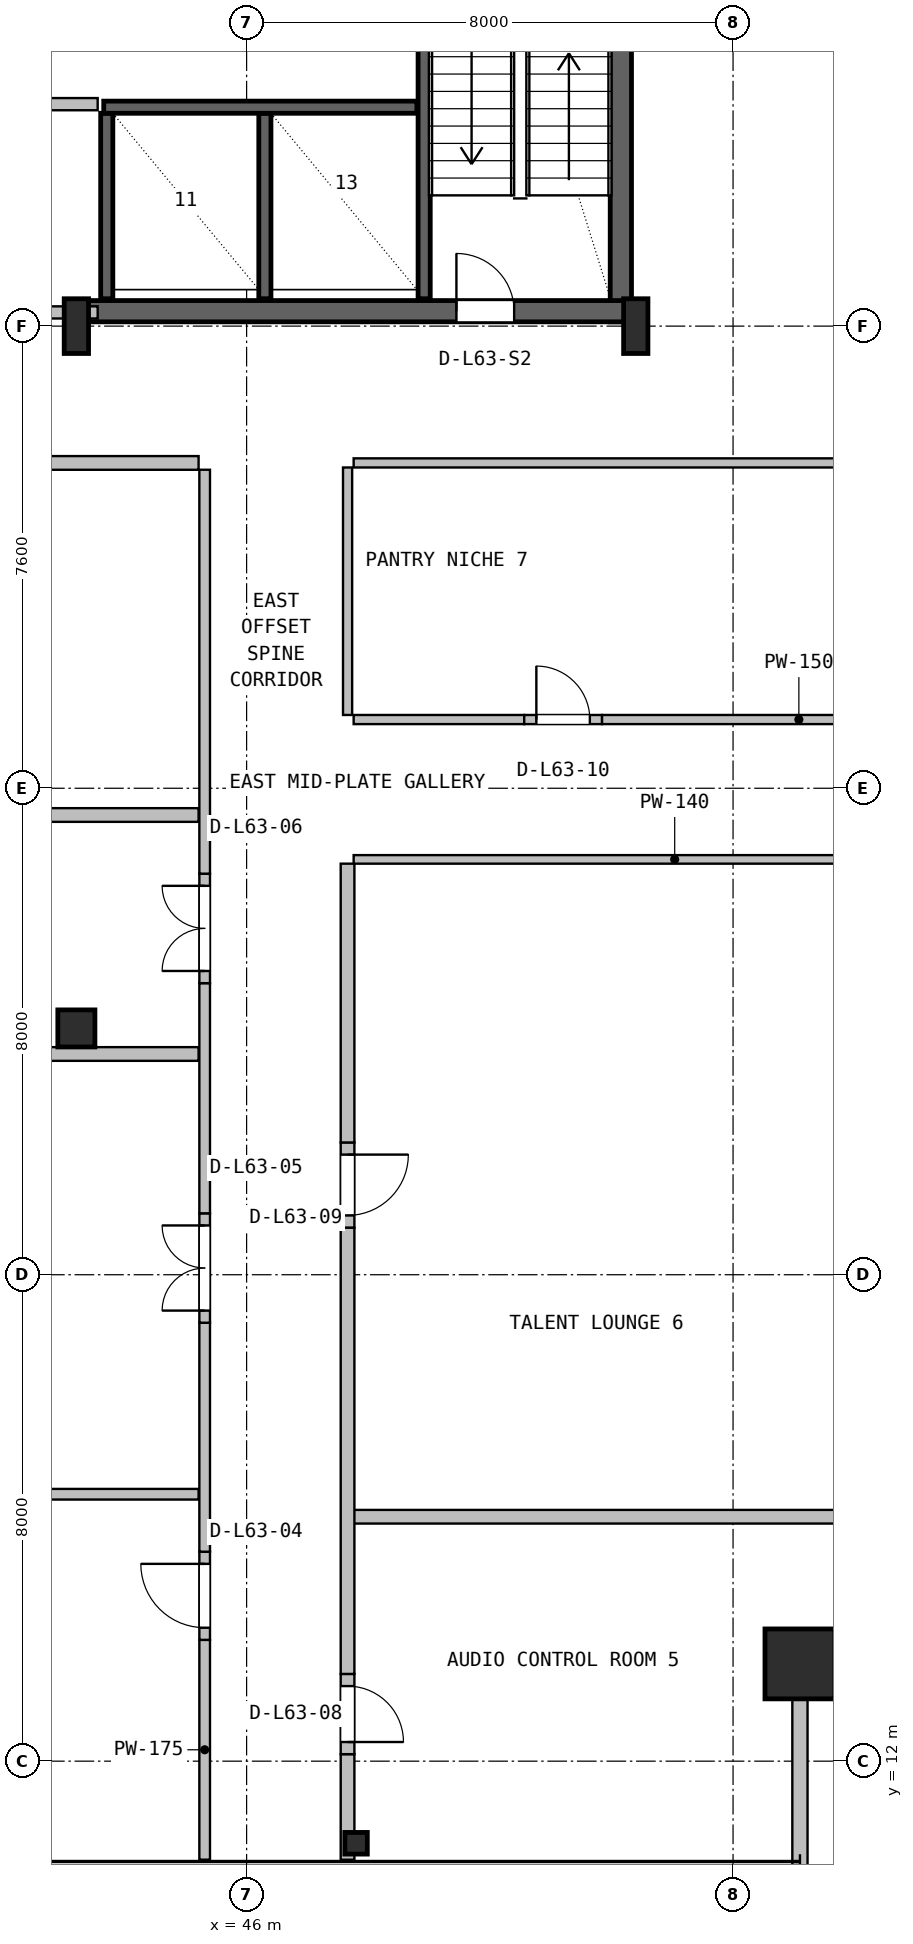
"""IFC4 building model, lengths in metres.
Left out: names, types, materials, properties, quantities, classifications, styles, units other than length and angle.
Written with IfcOpenShell. Run it as: python <this file> out.ifc"""

import sys

from ifc_helpers import new_model, si_unit, direction, frame, frame_2d, origin, origin_2d, place, context, subcontext, project, spatial, rectangle, hollow_rectangle, hollow_circle, i_section, extrude, source, transform, mapped, element, fill, save


model = new_model("IFC4")
c1 = context("Model", 3, precision=1e-05, world=origin(), true_north=direction((0.0, 1.0)))
c2 = subcontext(c1, "Body", "Model", "MODEL_VIEW")
j1 = project(units=[si_unit("LENGTHUNIT", "METRE"), si_unit("PLANEANGLEUNIT", "RADIAN")], contexts=[c1])
p1 = place(None, origin())
s1 = spatial("IfcSite", under=j1, at=p1, CompositionType="ELEMENT")
p2 = place(p1, origin())
s2 = spatial("IfcBuilding", under=s1, at=p2, CompositionType="ELEMENT")
p3 = place(p2, frame((0.0, 0.0, 254.6)))
s3 = spatial("IfcBuildingStorey", under=s2, at=p3, CompositionType="ELEMENT", Elevation=254.6)
p4 = place(p3, frame((52.155, 35.67, 0.0), z_axis=(0.0, 0.0, 1.0), x_axis=(0.0, 1.0, 0.0)))
e1 = element("IfcWall", 1, at=p4, inside=s3, PredefinedType="SHEAR", context=c2, shape_type="SweptSolid", body=[
    extrude(rectangle(XDim=11.13, YDim=0.35, at=frame_2d((5.565, 0.0))), origin(), (0.0, 0.0, 1.0), 3.55),
])
p5 = place(p3, frame((43.2, 35.845, 0.0), z_axis=(0.0, 0.0, 1.0), x_axis=(1.0, 0.0, 0.0)))
e2 = element("IfcWall", 2, at=p5, inside=s3, PredefinedType="SHEAR", context=c2, shape_type="SweptSolid", body=[
    extrude(rectangle(XDim=9.13, YDim=0.35, at=frame_2d((4.565, 0.0))), origin(), (0.0, 0.0, 1.0), 3.55),
])
p6 = place(p5, frame((6.25, 0.0, 0.0)))
e3 = element("IfcOpeningElement", 3, at=p6, cuts=e2, PredefinedType="OPENING", context=c2, shape_type="SweptSolid", body=[
    extrude(rectangle(XDim=0.95, YDim=2.1, at=frame_2d((0.475, 1.05))), frame((0.0, 0.185, 0.0), z_axis=(0.0, -1.0, 0.0), x_axis=(1.0, 0.0, 0.0)), (0.0, 0.0, 1.0), 0.37),
])
m1 = source(origin(), c2, "Body", "SweptSolid", [
    extrude(i_section(OverallWidth=0.4, OverallDepth=0.9, WebThickness=0.016, FlangeThickness=0.028, FilletRadius=0.016, at=origin_2d()), origin(), (0.0, 0.0, 1.0), 3.8),
])
for number, where, z_axis, x_axis in (
    (4, (43.2, 35.6, 0.0), (0.0, 0.0, 1.0), (1.0, 0.0, 0.0)),
    (5, (52.4, 35.6, 0.0), (0.0, 0.0, 1.0), (1.0, 0.0, 0.0)),
):
    element("IfcColumn", number, at=place(p3, frame(where, z_axis=z_axis, x_axis=x_axis)), inside=s3, PredefinedType="COLUMN", context=c2, shape_type="MappedRepresentation", body=[
        mapped(m1, transform((0.0, 0.0, 0.0), x_axis=(1.0, 0.0, 0.0), y_axis=(0.0, 1.0, 0.0), z_axis=(0.0, 0.0, 1.0), scale=1.0)),
    ])
m2 = source(origin(), c2, "Body", "SweptSolid", [
    extrude(hollow_rectangle(XDim=1.15, YDim=1.15, WallThickness=0.045, at=origin_2d()), origin(), (0.0, 0.0, 1.0), 3.8),
])
p7 = place(p3, frame((55.1, 13.6, 0.0), z_axis=(0.0, 0.0, 1.0), x_axis=(1.0, 0.0, 0.0)))
e6 = element("IfcColumn", 6, at=p7, inside=s3, PredefinedType="COLUMN", context=c2, shape_type="MappedRepresentation", body=[
    mapped(m2, transform((0.0, 0.0, 0.0), x_axis=(1.0, 0.0, 0.0), y_axis=(0.0, 1.0, 0.0), z_axis=(0.0, 0.0, 1.0), scale=1.0)),
])
m3 = source(origin(), c2, "Body", "SweptSolid", [
    extrude(i_section(OverallWidth=0.369, OverallDepth=0.356, WebThickness=0.011, FlangeThickness=0.018, FilletRadius=0.016, at=origin_2d()), origin(), (0.0, 0.0, 1.0), 3.8),
])
p8 = place(p3, frame((47.8, 10.65, 0.0), z_axis=(0.0, 0.0, 1.0), x_axis=(1.0, 0.0, 0.0)))
e7 = element("IfcColumn", 7, at=p8, inside=s3, PredefinedType="COLUMN", context=c2, shape_type="MappedRepresentation", body=[
    mapped(m3, transform((0.0, 0.0, 0.0), x_axis=(1.0, 0.0, 0.0), y_axis=(0.0, 1.0, 0.0), z_axis=(0.0, 0.0, 1.0), scale=1.0)),
])
m4 = source(origin(), c2, "Body", "SweptSolid", [
    extrude(hollow_circle(Radius=0.305, WallThickness=0.025, at=origin_2d()), origin(), (0.0, 0.0, 1.0), 3.8),
])
p9 = place(p3, frame((43.2, 24.05, 0.0), z_axis=(0.0, 0.0, 1.0), x_axis=(1.0, 0.0, 0.0)))
e8 = element("IfcColumn", 8, at=p9, inside=s3, PredefinedType="COLUMN", context=c2, shape_type="MappedRepresentation", body=[
    mapped(m4, transform((0.0, 0.0, 0.0), x_axis=(1.0, 0.0, 0.0), y_axis=(0.0, 1.0, 0.0), z_axis=(0.0, 0.0, 1.0), scale=1.0)),
])
p10 = place(p3, frame((55.1, 10.28, 0.0), z_axis=(0.0, 0.0, 1.0), x_axis=(0.0, 1.0, 0.0)))
e9 = element("IfcWall", 9, at=p10, inside=s3, PredefinedType="SOLIDWALL", context=c2, shape_type="SweptSolid", body=[
    extrude(rectangle(XDim=3.4, YDim=0.25, at=frame_2d((1.7, 0.0))), origin(), (0.0, 0.0, 1.0), 1.925),
])
p11 = place(p3, frame((48.92, 36.05, 0.0), z_axis=(0.0, 0.0, 1.0), x_axis=(0.0, 1.0, 0.0)))
e10 = element("IfcWall", 10, at=p11, inside=s3, PredefinedType="SHEAR", context=c2, shape_type="SweptSolid", body=[
    extrude(rectangle(XDim=10.5, YDim=0.2, at=frame_2d((5.25, 0.0))), origin(), (0.0, 0.0, 1.0), 3.55),
])
for number, where, z_axis, x_axis in (
    (11, (43.7, 36.05, 0.0), (0.0, 0.0, 1.0), (0.0, 1.0, 0.0)),
    (12, (46.3, 36.05, 0.0), (0.0, 0.0, 1.0), (0.0, 1.0, 0.0)),
):
    element("IfcWall", number, at=place(p3, frame(where, z_axis=z_axis, x_axis=x_axis)), inside=s3, PredefinedType="SHEAR", context=c2, shape_type="SweptSolid", body=[
        extrude(rectangle(XDim=3.05, YDim=0.2, at=frame_2d((1.525, 0.0))), origin(), (0.0, 0.0, 1.0), 3.55),
    ])
p12 = place(p3, frame((43.65, 39.2, 0.0), z_axis=(0.0, 0.0, 1.0), x_axis=(1.0, 0.0, 0.0)))
e13 = element("IfcWall", 13, at=p12, inside=s3, PredefinedType="SHEAR", context=c2, shape_type="SweptSolid", body=[
    extrude(rectangle(XDim=5.15, YDim=0.2, at=frame_2d((2.575, 0.0))), origin(), (0.0, 0.0, 1.0), 3.55),
])
p13 = place(p3, frame((39.85, 35.825, 0.0), z_axis=(0.0, 0.0, 1.0), x_axis=(1.0, 0.0, 0.0)))
e14 = element("IfcWall", 14, at=p13, inside=s3, PredefinedType="SOLIDWALL", context=c2, shape_type="SweptSolid", body=[
    extrude(rectangle(XDim=3.7, YDim=0.2, at=frame_2d((1.85, 0.0))), origin(), (0.0, 0.0, 1.0), 2.575),
])
p14 = place(p3, frame((39.85, 39.25, 0.0), z_axis=(0.0, 0.0, 1.0), x_axis=(1.0, 0.0, 0.0)))
e15 = element("IfcWall", 15, at=p14, inside=s3, PredefinedType="SOLIDWALL", context=c2, shape_type="SweptSolid", body=[
    extrude(rectangle(XDim=3.7, YDim=0.2, at=frame_2d((1.85, 0.0))), origin(), (0.0, 0.0, 1.0), 3.53),
])
p15 = place(p14, frame((1.25, 0.0, 0.0)))
e16 = element("IfcOpeningElement", 16, at=p15, cuts=e15, PredefinedType="OPENING", context=c2, shape_type="SweptSolid", body=[
    extrude(rectangle(XDim=1.2, YDim=2.1, at=frame_2d((0.6, 1.05))), frame((0.0, 0.11, 0.0), z_axis=(0.0, -1.0, 0.0), x_axis=(1.0, 0.0, 0.0)), (0.0, 0.0, 1.0), 0.22),
])
p16 = place(p3, frame((45.31, 10.38, 0.0), z_axis=(0.0, 0.0, 1.0), x_axis=(0.0, 1.0, 0.0)))
e17 = element("IfcWall", 17, at=p16, inside=s3, PredefinedType="PARTITIONING", context=c2, shape_type="SweptSolid", body=[
    extrude(rectangle(XDim=3.615, YDim=0.175, at=frame_2d((1.808, 0.0))), origin(), (0.0, 0.0, 1.0), 1.925),
])
p17 = place(p3, frame((45.31, 13.995, 0.0), z_axis=(0.0, 0.0, 1.0), x_axis=(0.0, 1.0, 0.0)))
e18 = element("IfcWall", 18, at=p17, inside=s3, PredefinedType="PARTITIONING", context=c2, shape_type="SweptSolid", body=[
    extrude(rectangle(XDim=1.45, YDim=0.175, at=frame_2d((0.725, 0.0))), origin(), (0.0, 0.0, 1.0), 3.278),
])
p18 = place(p17, frame((0.2, 0.0, 0.0)))
e19 = element("IfcOpeningElement", 19, at=p18, cuts=e18, PredefinedType="OPENING", context=c2, shape_type="SweptSolid", body=[
    extrude(rectangle(XDim=1.05, YDim=2.1, at=frame_2d((0.525, 1.05))), frame((0.0, 0.098, 0.0), z_axis=(0.0, -1.0, 0.0), x_axis=(1.0, 0.0, 0.0)), (0.0, 0.0, 1.0), 0.195),
])
p19 = place(p3, frame((45.31, 15.445, 0.0), z_axis=(0.0, 0.0, 1.0), x_axis=(0.0, 1.0, 0.0)))
e20 = element("IfcWall", 20, at=p19, inside=s3, PredefinedType="PARTITIONING", context=c2, shape_type="SweptSolid", body=[
    extrude(rectangle(XDim=3.765, YDim=0.175, at=frame_2d((1.882, 0.0))), origin(), (0.0, 0.0, 1.0), 2.195),
])
p20 = place(p3, frame((45.31, 19.21, 0.0), z_axis=(0.0, 0.0, 1.0), x_axis=(0.0, 1.0, 0.0)))
e21 = element("IfcWall", 21, at=p20, inside=s3, PredefinedType="PARTITIONING", context=c2, shape_type="SweptSolid", body=[
    extrude(rectangle(XDim=1.8, YDim=0.175, at=frame_2d((0.9, 0.0))), origin(), (0.0, 0.0, 1.0), 2.195),
])
p21 = place(p20, frame((0.2, 0.0, 0.0)))
e22 = element("IfcOpeningElement", 22, at=p21, cuts=e21, PredefinedType="OPENING", context=c2, shape_type="SweptSolid", body=[
    extrude(rectangle(XDim=1.4, YDim=2.12, at=frame_2d((0.7, 1.06))), frame((0.0, 0.098, 0.0), z_axis=(0.0, -1.0, 0.0), x_axis=(1.0, 0.0, 0.0)), (0.0, 0.0, 1.0), 0.195),
])
p22 = place(p3, frame((45.31, 21.01, 0.0), z_axis=(0.0, 0.0, 1.0), x_axis=(0.0, 1.0, 0.0)))
e23 = element("IfcWall", 23, at=p22, inside=s3, PredefinedType="PARTITIONING", context=c2, shape_type="SweptSolid", body=[
    extrude(rectangle(XDim=3.785, YDim=0.175, at=frame_2d((1.893, 0.0))), origin(), (0.0, 0.0, 1.0), 1.925),
])
p23 = place(p3, frame((45.31, 24.795, 0.0), z_axis=(0.0, 0.0, 1.0), x_axis=(0.0, 1.0, 0.0)))
e24 = element("IfcWall", 24, at=p23, inside=s3, PredefinedType="PARTITIONING", context=c2, shape_type="SweptSolid", body=[
    extrude(rectangle(XDim=1.8, YDim=0.175, at=frame_2d((0.9, 0.0))), origin(), (0.0, 0.0, 1.0), 2.195),
])
p24 = place(p23, frame((0.2, 0.0, 0.0)))
e25 = element("IfcOpeningElement", 25, at=p24, cuts=e24, PredefinedType="OPENING", context=c2, shape_type="SweptSolid", body=[
    extrude(rectangle(XDim=1.4, YDim=2.12, at=frame_2d((0.7, 1.06))), frame((0.0, 0.098, 0.0), z_axis=(0.0, -1.0, 0.0), x_axis=(1.0, 0.0, 0.0)), (0.0, 0.0, 1.0), 0.195),
])
p25 = place(p3, frame((45.31, 26.595, 0.0), z_axis=(0.0, 0.0, 1.0), x_axis=(0.0, 1.0, 0.0)))
e26 = element("IfcWall", 26, at=p25, inside=s3, PredefinedType="PARTITIONING", context=c2, shape_type="SweptSolid", body=[
    extrude(rectangle(XDim=6.643, YDim=0.175, at=frame_2d((3.322, 0.0))), origin(), (0.0, 0.0, 1.0), 3.222),
])
p26 = place(p3, frame((9.68, 16.39, 0.0), z_axis=(0.0, 0.0, 1.0), x_axis=(1.0, 0.0, 0.0)))
e27 = element("IfcWall", 27, at=p26, inside=s3, PredefinedType="PARTITIONING", context=c2, shape_type="SweptSolid", body=[
    extrude(rectangle(XDim=35.53, YDim=0.175, at=frame_2d((17.765, 0.0))), origin(), (0.0, 0.0, 1.0), 1.925),
])
for number, where, z_axis, x_axis in (
    (28, (9.68, 23.63, 0.0), (0.0, 0.0, 1.0), (1.0, 0.0, 0.0)),
    (29, (9.68, 27.56, 0.0), (0.0, 0.0, 1.0), (1.0, 0.0, 0.0)),
):
    element("IfcWall", number, at=place(p3, frame(where, z_axis=z_axis, x_axis=x_axis)), inside=s3, PredefinedType="PARTITIONING", context=c2, shape_type="SweptSolid", body=[
        extrude(rectangle(XDim=35.53, YDim=0.225, at=frame_2d((17.765, 0.0))), origin(), (0.0, 0.0, 1.0), 1.925),
    ])
p27 = place(p3, frame((30.18, 33.35, 0.0), z_axis=(0.0, 0.0, 1.0), x_axis=(1.0, 0.0, 0.0)))
e30 = element("IfcWall", 30, at=p27, inside=s3, PredefinedType="PARTITIONING", context=c2, shape_type="SweptSolid", body=[
    extrude(rectangle(XDim=15.03, YDim=0.225, at=frame_2d((7.515, 0.0))), origin(), (0.0, 0.0, 1.0), 2.195),
])
p28 = place(p3, frame((47.76, 16.02, 0.0), z_axis=(0.0, 0.0, 1.0), x_axis=(1.0, 0.0, 0.0)))
e31 = element("IfcWall", 31, at=p28, inside=s3, PredefinedType="PARTITIONING", context=c2, shape_type="SweptSolid", body=[
    extrude(rectangle(XDim=10.56, YDim=0.225, at=frame_2d((5.28, 0.0))), origin(), (0.0, 0.0, 1.0), 1.925),
])
p29 = place(p3, frame((47.66, 10.38, 0.0), z_axis=(0.0, 0.0, 1.0), x_axis=(0.0, 1.0, 0.0)))
e32 = element("IfcWall", 32, at=p29, inside=s3, PredefinedType="PARTITIONING", context=c2, shape_type="SweptSolid", body=[
    extrude(rectangle(XDim=1.735, YDim=0.225, at=frame_2d((0.868, 0.0))), origin(), (0.0, 0.0, 1.0), 2.195),
])
p30 = place(p3, frame((47.66, 12.115, 0.0), z_axis=(0.0, 0.0, 1.0), x_axis=(0.0, 1.0, 0.0)))
e33 = element("IfcWall", 33, at=p30, inside=s3, PredefinedType="PARTITIONING", context=c2, shape_type="SweptSolid", body=[
    extrude(rectangle(XDim=1.32, YDim=0.225, at=frame_2d((0.66, 0.0))), origin(), (0.0, 0.0, 1.0), 1.925),
])
p31 = place(p30, frame((0.2, 0.0, 0.0)))
e34 = element("IfcOpeningElement", 34, at=p31, cuts=e33, PredefinedType="OPENING", context=c2, shape_type="SweptSolid", body=[
    extrude(rectangle(XDim=0.92, YDim=2.0, at=frame_2d((0.46, 1.0))), frame((0.0, 0.123, 0.0), z_axis=(0.0, -1.0, 0.0), x_axis=(1.0, 0.0, 0.0)), (0.0, 0.0, 1.0), 0.245),
])
p32 = place(p3, frame((47.66, 13.435, 0.0), z_axis=(0.0, 0.0, 1.0), x_axis=(0.0, 1.0, 0.0)))
e35 = element("IfcWall", 35, at=p32, inside=s3, PredefinedType="PARTITIONING", context=c2, shape_type="SweptSolid", body=[
    extrude(rectangle(XDim=7.34, YDim=0.225, at=frame_2d((3.67, 0.0))), origin(), (0.0, 0.0, 1.0), 1.925),
])
p33 = place(p3, frame((47.66, 20.775, 0.0), z_axis=(0.0, 0.0, 1.0), x_axis=(0.0, 1.0, 0.0)))
e36 = element("IfcWall", 36, at=p33, inside=s3, PredefinedType="PARTITIONING", context=c2, shape_type="SweptSolid", body=[
    extrude(rectangle(XDim=1.4, YDim=0.225, at=frame_2d((0.7, 0.0))), origin(), (0.0, 0.0, 1.0), 3.53),
])
p34 = place(p33, frame((0.2, 0.0, 0.0)))
e37 = element("IfcOpeningElement", 37, at=p34, cuts=e36, PredefinedType="OPENING", context=c2, shape_type="SweptSolid", body=[
    extrude(rectangle(XDim=1.0, YDim=2.1, at=frame_2d((0.5, 1.05))), frame((0.0, 0.123, 0.0), z_axis=(0.0, -1.0, 0.0), x_axis=(1.0, 0.0, 0.0)), (0.0, 0.0, 1.0), 0.245),
])
p35 = place(p3, frame((47.66, 22.175, 0.0), z_axis=(0.0, 0.0, 1.0), x_axis=(0.0, 1.0, 0.0)))
e38 = element("IfcWall", 38, at=p35, inside=s3, PredefinedType="PARTITIONING", context=c2, shape_type="SweptSolid", body=[
    extrude(rectangle(XDim=4.585, YDim=0.225, at=frame_2d((2.292, 0.0))), origin(), (0.0, 0.0, 1.0), 1.925),
])
p36 = place(p3, frame((47.76, 26.83, 0.0), z_axis=(0.0, 0.0, 1.0), x_axis=(1.0, 0.0, 0.0)))
e39 = element("IfcWall", 39, at=p36, inside=s3, PredefinedType="PARTITIONING", context=c2, shape_type="SweptSolid", body=[
    extrude(rectangle(XDim=10.56, YDim=0.14, at=frame_2d((5.28, 0.0))), origin(), (0.0, 0.0, 1.0), 1.925),
])
p37 = place(p3, frame((47.76, 29.13, 0.0), z_axis=(0.0, 0.0, 1.0), x_axis=(1.0, 0.0, 0.0)))
e40 = element("IfcWall", 40, at=p37, inside=s3, PredefinedType="PARTITIONING", context=c2, shape_type="SweptSolid", body=[
    extrude(rectangle(XDim=2.805, YDim=0.15, at=frame_2d((1.402, 0.0))), origin(), (0.0, 0.0, 1.0), 3.53),
])
p38 = place(p3, frame((50.565, 29.13, 0.0), z_axis=(0.0, 0.0, 1.0), x_axis=(1.0, 0.0, 0.0)))
e41 = element("IfcWall", 41, at=p38, inside=s3, PredefinedType="PARTITIONING", context=c2, shape_type="SweptSolid", body=[
    extrude(rectangle(XDim=1.28, YDim=0.15, at=frame_2d((0.64, 0.0))), origin(), (0.0, 0.0, 1.0), 3.53),
])
p39 = place(p38, frame((0.2, 0.0, 0.0)))
e42 = element("IfcOpeningElement", 42, at=p39, cuts=e41, PredefinedType="OPENING", context=c2, shape_type="SweptSolid", body=[
    extrude(rectangle(XDim=0.88, YDim=2.06, at=frame_2d((0.44, 1.03))), frame((0.0, 0.085, 0.0), z_axis=(0.0, -1.0, 0.0), x_axis=(1.0, 0.0, 0.0)), (0.0, 0.0, 1.0), 0.17),
])
p40 = place(p3, frame((51.845, 29.13, 0.0), z_axis=(0.0, 0.0, 1.0), x_axis=(1.0, 0.0, 0.0)))
e43 = element("IfcWall", 43, at=p40, inside=s3, PredefinedType="PARTITIONING", context=c2, shape_type="SweptSolid", body=[
    extrude(rectangle(XDim=6.475, YDim=0.15, at=frame_2d((3.238, 0.0))), origin(), (0.0, 0.0, 1.0), 1.925),
])
p41 = place(p3, frame((47.76, 33.35, 0.0), z_axis=(0.0, 0.0, 1.0), x_axis=(1.0, 0.0, 0.0)))
e44 = element("IfcWall", 44, at=p41, inside=s3, PredefinedType="PARTITIONING", context=c2, shape_type="SweptSolid", body=[
    extrude(rectangle(XDim=10.56, YDim=0.15, at=frame_2d((5.28, 0.0))), origin(), (0.0, 0.0, 1.0), 1.925),
])
p42 = place(p3, frame((47.66, 29.205, 0.0), z_axis=(0.0, 0.0, 1.0), x_axis=(0.0, 1.0, 0.0)))
e45 = element("IfcWall", 45, at=p42, inside=s3, PredefinedType="PARTITIONING", context=c2, shape_type="SweptSolid", body=[
    extrude(rectangle(XDim=4.07, YDim=0.15, at=frame_2d((2.035, 0.0))), origin(), (0.0, 0.0, 1.0), 3.53),
])
m5 = source(origin(), c2, "Body", "SweptSolid", [
    extrude(rectangle(XDim=0.95, YDim=2.1, at=frame_2d((0.475, 1.05))), frame((0.0, 0.025, 0.0), z_axis=(0.0, -1.0, 0.0), x_axis=(1.0, 0.0, 0.0)), (0.0, 0.0, 1.0), 0.05),
])
p43 = place(p6, origin())
e46 = element("IfcDoor", 46, at=p43, inside=s3, OperationType="SINGLE_SWING_LEFT", PredefinedType="DOOR", context=c2, shape_type="MappedRepresentation", body=[
    mapped(m5, transform((0.0, 0.0, 0.0), x_axis=(1.0, 0.0, 0.0), y_axis=(0.0, 1.0, 0.0), z_axis=(0.0, 0.0, 1.0), scale=1.0)),
])
fill(e3, e46)
m6 = source(origin(), c2, "Body", "SweptSolid", [
    extrude(rectangle(XDim=1.05, YDim=2.1, at=frame_2d((0.525, 1.05))), frame((0.0, 0.025, 0.0), z_axis=(0.0, -1.0, 0.0), x_axis=(1.0, 0.0, 0.0)), (0.0, 0.0, 1.0), 0.05),
])
p44 = place(p18, origin())
e47 = element("IfcDoor", 47, at=p44, inside=s3, OperationType="SINGLE_SWING_RIGHT", PredefinedType="DOOR", context=c2, shape_type="MappedRepresentation", body=[
    mapped(m6, transform((0.0, 0.0, 0.0), x_axis=(1.0, 0.0, 0.0), y_axis=(0.0, 1.0, 0.0), z_axis=(0.0, 0.0, 1.0), scale=1.0)),
])
fill(e19, e47)
m7 = source(origin(), c2, "Body", "SweptSolid", [
    extrude(rectangle(XDim=1.4, YDim=2.12, at=frame_2d((0.7, 1.06))), frame((0.0, 0.025, 0.0), z_axis=(0.0, -1.0, 0.0), x_axis=(1.0, 0.0, 0.0)), (0.0, 0.0, 1.0), 0.05),
])
p45 = place(p21, origin())
e48 = element("IfcDoor", 48, at=p45, inside=s3, OperationType="DOUBLE_DOOR_SINGLE_SWING", PredefinedType="DOOR", context=c2, shape_type="MappedRepresentation", body=[
    mapped(m7, transform((0.0, 0.0, 0.0), x_axis=(1.0, 0.0, 0.0), y_axis=(0.0, 1.0, 0.0), z_axis=(0.0, 0.0, 1.0), scale=1.0)),
])
fill(e22, e48)
p46 = place(p24, origin())
e49 = element("IfcDoor", 49, at=p46, inside=s3, OperationType="DOUBLE_DOOR_SINGLE_SWING", PredefinedType="DOOR", context=c2, shape_type="MappedRepresentation", body=[
    mapped(m7, transform((0.0, 0.0, 0.0), x_axis=(1.0, 0.0, 0.0), y_axis=(0.0, 1.0, 0.0), z_axis=(0.0, 0.0, 1.0), scale=1.0)),
])
fill(e25, e49)
m8 = source(origin(), c2, "Body", "SweptSolid", [
    extrude(rectangle(XDim=0.92, YDim=2.0, at=frame_2d((0.46, 1.0))), frame((0.0, 0.025, 0.0), z_axis=(0.0, -1.0, 0.0), x_axis=(1.0, 0.0, 0.0)), (0.0, 0.0, 1.0), 0.05),
])
p47 = place(p31, frame((0.92, 0.0, 0.0), z_axis=(0.0, 0.0, 1.0), x_axis=(-1.0, 0.0, 0.0)))
e50 = element("IfcDoor", 50, at=p47, inside=s3, OperationType="SINGLE_SWING_LEFT", PredefinedType="DOOR", context=c2, shape_type="MappedRepresentation", body=[
    mapped(m8, transform((0.0, 0.0, 0.0), x_axis=(1.0, 0.0, 0.0), y_axis=(0.0, 1.0, 0.0), z_axis=(0.0, 0.0, 1.0), scale=1.0)),
])
fill(e34, e50)
m9 = source(origin(), c2, "Body", "SweptSolid", [
    extrude(rectangle(XDim=1.0, YDim=2.1, at=frame_2d((0.5, 1.05))), frame((0.0, 0.025, 0.0), z_axis=(0.0, -1.0, 0.0), x_axis=(1.0, 0.0, 0.0)), (0.0, 0.0, 1.0), 0.05),
])
p48 = place(p34, frame((1.0, 0.0, 0.0), z_axis=(0.0, 0.0, 1.0), x_axis=(-1.0, 0.0, 0.0)))
e51 = element("IfcDoor", 51, at=p48, inside=s3, OperationType="SINGLE_SWING_RIGHT", PredefinedType="DOOR", context=c2, shape_type="MappedRepresentation", body=[
    mapped(m9, transform((0.0, 0.0, 0.0), x_axis=(1.0, 0.0, 0.0), y_axis=(0.0, 1.0, 0.0), z_axis=(0.0, 0.0, 1.0), scale=1.0)),
])
fill(e37, e51)
m10 = source(origin(), c2, "Body", "SweptSolid", [
    extrude(rectangle(XDim=0.88, YDim=2.06, at=frame_2d((0.44, 1.03))), frame((0.0, 0.025, 0.0), z_axis=(0.0, -1.0, 0.0), x_axis=(1.0, 0.0, 0.0)), (0.0, 0.0, 1.0), 0.05),
])
p49 = place(p39, origin())
e52 = element("IfcDoor", 52, at=p49, inside=s3, OperationType="SINGLE_SWING_LEFT", PredefinedType="DOOR", context=c2, shape_type="MappedRepresentation", body=[
    mapped(m10, transform((0.0, 0.0, 0.0), x_axis=(1.0, 0.0, 0.0), y_axis=(0.0, 1.0, 0.0), z_axis=(0.0, 0.0, 1.0), scale=1.0)),
])
fill(e42, e52)
save(model, sys.argv[1])
